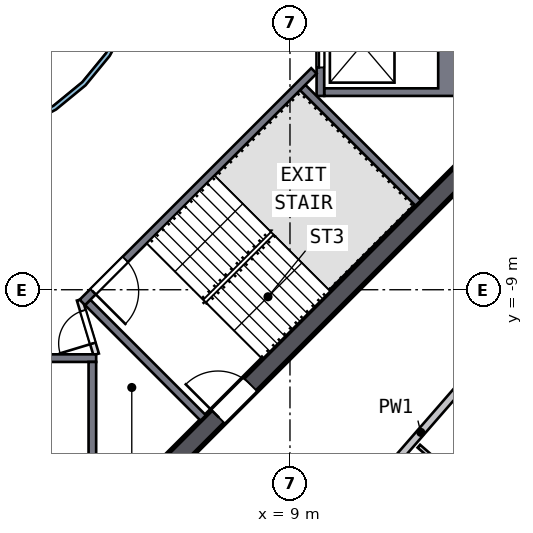
"""IFC4 building model, lengths in metres.
Left out: names, types, materials, properties, quantities, classifications, styles, units other than length and angle.
Written with IfcOpenShell. Run it as: python <this file> out.ifc"""

import sys

from ifc_helpers import new_model, si_unit, direction, frame, frame_2d, origin, place, context, subcontext, project, spatial, polyline, rectangle, outline, extrude, element, fill, save


model = new_model("IFC4")
c1 = context("Model", 3, precision=1e-05, world=origin(), true_north=direction((0.0, 1.0)))
c2 = subcontext(c1, "Body", "Model", "MODEL_VIEW")
j1 = project(units=[si_unit("LENGTHUNIT", "METRE"), si_unit("PLANEANGLEUNIT", "RADIAN")], contexts=[c1])
p1 = place(None, origin())
s1 = spatial("IfcSite", under=j1, at=p1, CompositionType="ELEMENT")
p2 = place(p1, origin())
s2 = spatial("IfcBuilding", under=s1, at=p2, CompositionType="ELEMENT")
p3 = place(p2, frame((0.0, 0.0, 234.0)))
s3 = spatial("IfcBuildingStorey", under=s2, at=p3, CompositionType="ELEMENT", Elevation=234.0)
p4 = place(p3, frame((5.622, -13.823, 0.0), z_axis=(0.0, 0.0, 1.0), x_axis=(0.707106781, 0.707106781, 0.0)))
e1 = element("IfcWall", 1, at=p4, inside=s3, PredefinedType="SHEAR", context=c2, shape_type="SweptSolid", body=[
    extrude(rectangle(XDim=11.598, YDim=0.5, at=frame_2d((5.799, 0.0))), origin(), (0.0, 0.0, 1.0), 3.5),
])
p5 = place(p4, frame((2.099, 0.0, 0.0)))
e2 = element("IfcOpeningElement", 2, at=p5, cuts=e1, PredefinedType="OPENING", context=c2, shape_type="SweptSolid", body=[
    extrude(rectangle(XDim=1.2, YDim=2.1, at=frame_2d((0.6, 1.05))), frame((0.0, 0.26, 0.0), z_axis=(0.0, -1.0, 0.0), x_axis=(1.0, 0.0, 0.0)), (0.0, 0.0, 1.0), 0.52),
])
p6 = place(p3, origin())
e3 = element("IfcWall", 3, at=p6, inside=s3, PredefinedType="SOLIDWALL", context=c2, shape_type="SweptSolid", body=[
    extrude(outline(polyline([(13.5, -3.9), (9.9, -3.9), (9.9, -3.7), (12.9, -3.7), (12.9, -1.4), (9.9, -1.4), (9.9, -1.2), (13.5, -1.2), (13.5, -3.9)])), origin(), (0.0, 0.0, 1.0), 3.19),
])
p7 = place(p3, frame((9.8, -1.2, 0.0), z_axis=(0.0, 0.0, 1.0), x_axis=(0.0, -1.0, 0.0)))
e4 = element("IfcWall", 4, at=p7, inside=s3, PredefinedType="SOLIDWALL", context=c2, shape_type="SweptSolid", body=[
    extrude(rectangle(XDim=2.7, YDim=0.2, at=frame_2d((1.35, 0.0))), origin(), (0.0, 0.0, 1.0), 3.19),
])
p8 = place(p7, frame((0.75, 0.0, 0.0)))
e5 = element("IfcOpeningElement", 5, at=p8, cuts=e4, PredefinedType="OPENING", context=c2, shape_type="SweptSolid", body=[
    extrude(rectangle(XDim=1.2, YDim=2.1, at=frame_2d((0.6, 1.05))), frame((0.0, 0.11, 0.0), z_axis=(0.0, -1.0, 0.0), x_axis=(1.0, 0.0, 0.0)), (0.0, 0.0, 1.0), 0.22),
])
p9 = place(p3, frame((-3.9, -10.8, 0.0), z_axis=(0.0, 0.0, 1.0), x_axis=(1.0, 0.0, 0.0)))
e6 = element("IfcWall", 6, at=p9, inside=s3, PredefinedType="SOLIDWALL", context=c2, shape_type="SweptSolid", body=[
    extrude(rectangle(XDim=7.8, YDim=0.2, at=frame_2d((3.9, 0.0))), origin(), (0.0, 0.0, 1.0), 3.19),
])
p10 = place(p9, frame((3.45, 0.0, 0.0)))
e7 = element("IfcOpeningElement", 7, at=p10, cuts=e6, PredefinedType="OPENING", context=c2, shape_type="SweptSolid", body=[
    extrude(rectangle(XDim=0.9, YDim=2.1, at=frame_2d((0.45, 1.05))), frame((0.0, 0.11, 0.0), z_axis=(0.0, -1.0, 0.0), x_axis=(1.0, 0.0, 0.0)), (0.0, 0.0, 1.0), 0.22),
])
p11 = place(p3, frame((3.8, -10.9, 0.0), z_axis=(0.0, 0.0, 1.0), x_axis=(0.0, -1.0, 0.0)))
e8 = element("IfcWall", 8, at=p11, inside=s3, PredefinedType="SOLIDWALL", context=c2, shape_type="SweptSolid", body=[
    extrude(rectangle(XDim=2.6, YDim=0.2, at=frame_2d((1.3, 0.0))), origin(), (0.0, 0.0, 1.0), 3.19),
])
p12 = place(p3, frame((9.629, -3.24, 0.0), z_axis=(0.0, 0.0, 1.0), x_axis=(-0.707120946, -0.707092617, 0.0)))
e9 = element("IfcWall", 9, at=p12, inside=s3, PredefinedType="SOLIDWALL", context=c2, shape_type="SweptSolid", body=[
    extrude(rectangle(XDim=8.618, YDim=0.2, at=frame_2d((4.309, 0.0))), origin(), (0.0, 0.0, 1.0), 3.19),
])
p13 = place(p12, frame((7.018, 0.0, 0.0)))
e10 = element("IfcOpeningElement", 10, at=p13, cuts=e9, PredefinedType="OPENING", context=c2, shape_type="SweptSolid", body=[
    extrude(rectangle(XDim=1.2, YDim=2.1, at=frame_2d((0.6, 1.05))), frame((0.0, 0.11, 0.0), z_axis=(0.0, -1.0, 0.0), x_axis=(1.0, 0.0, 0.0)), (0.0, 0.0, 1.0), 0.22),
])
for number, where, z_axis, x_axis in (
    (11, (3.677, -9.334, 0.0), (0.0, 0.0, 1.0), (0.707, -0.707, 0.0)),
    (12, (9.334, -3.677, 0.0), (0.0, 0.0, 1.0), (0.707, -0.707, 0.0)),
):
    element("IfcWall", number, at=place(p3, frame(where, z_axis=z_axis, x_axis=x_axis)), inside=s3, PredefinedType="SOLIDWALL", context=c2, shape_type="SweptSolid", body=[
        extrude(rectangle(XDim=4.3, YDim=0.2, at=frame_2d((2.15, 0.0))), origin(), (0.0, 0.0, 1.0), 3.19),
    ])
p14 = place(p3, frame((3.9, -10.7, 0.0), z_axis=(0.0, 0.0, 1.0), x_axis=(-0.289808785, 0.957084567, 0.0)))
e13 = element("IfcWall", 13, at=p14, inside=s3, PredefinedType="PARTITIONING", context=c2, shape_type="SweptSolid", body=[
    extrude(rectangle(XDim=1.501, YDim=0.15, at=frame_2d((0.75, 0.0))), origin(), (0.0, 0.0, 1.0), 3.19),
])
p15 = place(p14, frame((0.301, 0.0, 0.0)))
e14 = element("IfcOpeningElement", 14, at=p15, cuts=e13, PredefinedType="OPENING", context=c2, shape_type="SweptSolid", body=[
    extrude(rectangle(XDim=0.9, YDim=2.1, at=frame_2d((0.45, 1.05))), frame((0.0, 0.085, 0.0), z_axis=(0.0, -1.0, 0.0), x_axis=(1.0, 0.0, 0.0)), (0.0, 0.0, 1.0), 0.17),
])
p16 = place(p3, origin())
e15 = element("IfcWall", 15, at=p16, inside=s3, PredefinedType="SOLIDWALL", context=c2, shape_type="SweptSolid", body=[
    extrude(outline(polyline([(5.021, -0.999), (4.73, -1.959), (4.257, -2.844), (3.62, -3.62), (2.844, -4.257), (1.959, -4.73), (0.999, -5.021), (0.0, -5.12), (-0.999, -5.021), (-1.959, -4.73), (-2.844, -4.257), (-3.62, -3.62), (-4.257, -2.844), (-4.73, -1.959), (-5.021, -0.999), (-5.12, 0.0), (-5.021, 0.999), (-4.73, 1.959), (-4.257, 2.844), (-3.62, 3.62), (-2.844, 4.257), (-1.959, 4.73), (-0.999, 5.021), (0.0, 5.12), (0.999, 5.021), (1.959, 4.73), (2.844, 4.257), (3.62, 3.62), (4.257, 2.844), (4.73, 1.959), (5.021, 0.999), (5.12, 0.0), (5.021, -0.999)]), holes=[polyline([(4.904, 0.976), (4.619, 1.913), (4.157, 2.778), (3.535, 3.535), (2.778, 4.157), (1.913, 4.619), (0.976, 4.904), (0.0, 5.0), (-0.976, 4.904), (-1.913, 4.619), (-2.778, 4.157), (-3.535, 3.535), (-4.157, 2.778), (-4.619, 1.913), (-4.904, 0.976), (-5.0, 0.0), (-4.904, -0.976), (-4.619, -1.913), (-4.157, -2.778), (-3.535, -3.535), (-2.778, -4.157), (-1.913, -4.619), (-0.976, -4.904), (0.0, -5.0), (0.976, -4.904), (1.913, -4.619), (2.778, -4.157), (3.535, -3.535), (4.157, -2.778), (4.619, -1.913), (4.904, -0.976), (5.0, 0.0), (4.904, 0.976)])]), origin(), (0.0, 0.0, 1.0), 3.19),
])
p17 = place(p3, frame((16.387, -8.222, 0.0), z_axis=(0.0, 0.0, 1.0), x_axis=(-0.656585706, -0.754251424, 0.0)))
e16 = element("IfcWall", 16, at=p17, inside=s3, PredefinedType="SOLIDWALL", context=c2, shape_type="SweptSolid", body=[
    extrude(rectangle(XDim=9.117, YDim=0.2, at=frame_2d((4.558, 0.0))), origin(), (0.0, 0.0, 1.0), 3.19),
])
p18 = place(p17, frame((1.7, 0.0, 0.0)))
e17 = element("IfcOpeningElement", 17, at=p18, cuts=e16, PredefinedType="OPENING", context=c2, shape_type="SweptSolid", body=[
    extrude(rectangle(XDim=1.0, YDim=2.1, at=frame_2d((0.5, 1.05))), frame((0.0, 0.11, 0.0), z_axis=(0.0, -1.0, 0.0), x_axis=(1.0, 0.0, 0.0)), (0.0, 0.0, 1.0), 0.22),
])
p19 = place(p3, frame((14.729, -15.153, 0.0), z_axis=(0.0, 0.0, 1.0), x_axis=(-0.754247659, 0.656590031, 0.0)))
e18 = element("IfcWall", 18, at=p19, inside=s3, PredefinedType="PARTITIONING", context=c2, shape_type="SweptSolid", body=[
    extrude(rectangle(XDim=3.1, YDim=0.1, at=frame_2d((1.55, 0.0))), origin(), (0.0, 0.0, 1.0), 3.19),
])
p20 = place(p19, frame((1.15, 0.0, 0.0)))
e19 = element("IfcOpeningElement", 19, at=p20, cuts=e18, PredefinedType="OPENING", context=c2, shape_type="SweptSolid", body=[
    extrude(rectangle(XDim=0.9, YDim=2.1, at=frame_2d((0.45, 1.05))), frame((0.0, 0.06, 0.0), z_axis=(0.0, -1.0, 0.0), x_axis=(1.0, 0.0, 0.0)), (0.0, 0.0, 1.0), 0.12),
])
p21 = place(p8, origin())
e20 = element("IfcDoor", 20, at=p21, inside=s3, OperationType="DOUBLE_DOOR_SLIDING", PredefinedType="DOOR", context=c2, shape_type="SweptSolid", body=[
    extrude(rectangle(XDim=1.2, YDim=2.1, at=frame_2d((0.6, 1.05))), frame((0.0, 0.025, 0.0), z_axis=(0.0, -1.0, 0.0), x_axis=(1.0, 0.0, 0.0)), (0.0, 0.0, 1.0), 0.05),
])
fill(e5, e20)
p22 = place(p13, origin())
e21 = element("IfcDoor", 21, at=p22, inside=s3, OperationType="SINGLE_SWING_RIGHT", PredefinedType="DOOR", context=c2, shape_type="SweptSolid", body=[
    extrude(rectangle(XDim=1.2, YDim=2.1, at=frame_2d((0.6, 1.05))), frame((0.0, 0.025, 0.0), z_axis=(0.0, -1.0, 0.0), x_axis=(1.0, 0.0, 0.0)), (0.0, 0.0, 1.0), 0.05),
])
fill(e10, e21)
p23 = place(p5, origin())
e22 = element("IfcDoor", 22, at=p23, inside=s3, OperationType="SINGLE_SWING_LEFT", PredefinedType="DOOR", context=c2, shape_type="SweptSolid", body=[
    extrude(rectangle(XDim=1.2, YDim=2.1, at=frame_2d((0.6, 1.05))), frame((0.0, 0.025, 0.0), z_axis=(0.0, -1.0, 0.0), x_axis=(1.0, 0.0, 0.0)), (0.0, 0.0, 1.0), 0.05),
])
fill(e2, e22)
p24 = place(p15, origin())
e23 = element("IfcDoor", 23, at=p24, inside=s3, OperationType="SINGLE_SWING_LEFT", PredefinedType="DOOR", context=c2, shape_type="SweptSolid", body=[
    extrude(rectangle(XDim=0.9, YDim=2.1, at=frame_2d((0.45, 1.05))), frame((0.0, 0.025, 0.0), z_axis=(0.0, -1.0, 0.0), x_axis=(1.0, 0.0, 0.0)), (0.0, 0.0, 1.0), 0.05),
])
fill(e14, e23)
save(model, sys.argv[1])
